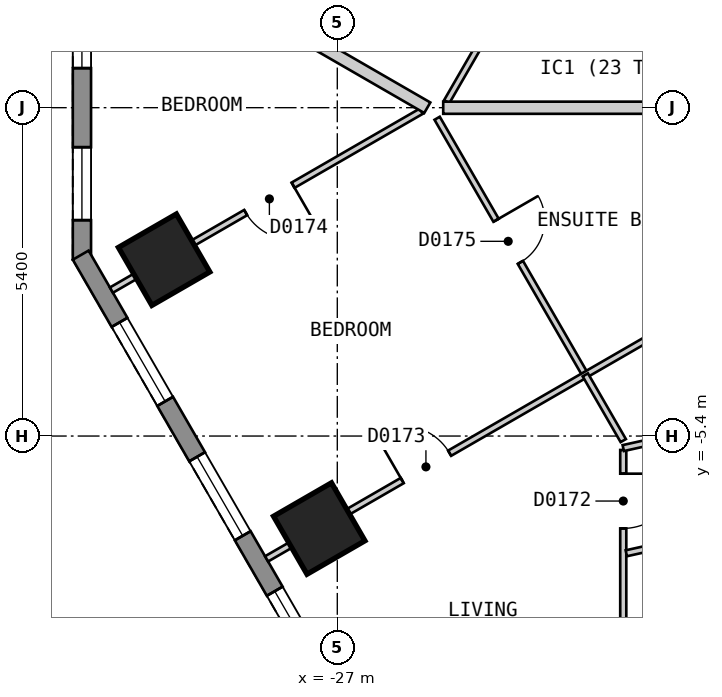
"""IFC4 building model, lengths in metres.
Left out: names, types, materials, properties, quantities, classifications, styles, units other than length and angle.
Written with IfcOpenShell. Run it as: python <this file> out.ifc"""

import sys

from ifc_helpers import new_model, si_unit, direction, frame, frame_2d, origin, origin_2d, place, context, subcontext, project, spatial, polyline, rectangle, outline, extrude, element, fill, save


model = new_model("IFC4")
c1 = context("Model", 3, precision=1e-05, world=origin(), true_north=direction((0.0, 1.0)))
c2 = subcontext(c1, "Body", "Model", "MODEL_VIEW")
j1 = project(units=[si_unit("LENGTHUNIT", "METRE"), si_unit("PLANEANGLEUNIT", "RADIAN")], contexts=[c1])
p1 = place(None, origin())
s1 = spatial("IfcSite", under=j1, at=p1, CompositionType="ELEMENT")
p2 = place(p1, origin())
s2 = spatial("IfcBuilding", under=s1, at=p2, CompositionType="ELEMENT")
p3 = place(p2, frame((0.0, 0.0, 29.4)))
s3 = spatial("IfcBuildingStorey", under=s2, at=p3, CompositionType="ELEMENT", Elevation=29.4)
for number, where, z_axis, x_axis in (
    (1, (-29.848, -2.5, 0.0), (0.0, 0.0, 1.0), (0.5, -0.866, 0.0)),
    (2, (-27.297, -6.921, 0.0), (0.0, 0.0, 1.0), (0.5, -0.866, 0.0)),
):
    element("IfcColumn", number, at=place(p3, frame(where, z_axis=z_axis, x_axis=x_axis)), inside=s3, PredefinedType="COLUMN", context=c2, shape_type="SweptSolid", body=[
        extrude(rectangle(XDim=1.1, YDim=1.1, at=origin_2d()), origin(), (0.0, 0.0, 1.0), 3.0),
    ])
p4 = place(p3, frame((-31.2, 2.5, 0.0), z_axis=(0.0, 0.0, 1.0), x_axis=(0.0, -1.0, 0.0)))
e3 = element("IfcWall", 3, at=p4, inside=s3, PredefinedType="SOLIDWALL", context=c2, shape_type="SweptSolid", body=[
    extrude(outline(polyline([(0.0, -0.15), (5.0, -0.15), (4.92, 0.15), (0.08, 0.15), (0.0, -0.15)])), origin(), (0.0, 0.0, 1.0), 2.7),
])
p5 = place(p4, frame((0.65, 0.0, 0.15)))
e4 = element("IfcOpeningElement", 4, at=p5, cuts=e3, PredefinedType="OPENING", context=c2, shape_type="SweptSolid", body=[
    extrude(rectangle(XDim=1.2, YDim=2.1, at=frame_2d((0.6, 1.05))), frame((0.0, 0.16, 0.0), z_axis=(0.0, -1.0, 0.0), x_axis=(1.0, 0.0, 0.0)), (0.0, 0.0, 1.0), 0.32),
])
p6 = place(p4, frame((3.15, 0.0, 0.15)))
e5 = element("IfcOpeningElement", 5, at=p6, cuts=e3, PredefinedType="OPENING", context=c2, shape_type="SweptSolid", body=[
    extrude(rectangle(XDim=1.2, YDim=2.1, at=frame_2d((0.6, 1.05))), frame((0.0, 0.16, 0.0), z_axis=(0.0, -1.0, 0.0), x_axis=(1.0, 0.0, 0.0)), (0.0, 0.0, 1.0), 0.32),
])
p7 = place(p3, frame((-31.22, -2.425, 0.0), z_axis=(0.0, 0.0, 1.0), x_axis=(0.500001938803, -0.866024284413, 0.0)))
e6 = element("IfcWall", 6, at=p7, inside=s3, PredefinedType="SOLIDWALL", context=c2, shape_type="SweptSolid", body=[
    extrude(outline(polyline([(0.0, -0.15), (27.02, -0.15), (26.94, 0.15), (0.08, 0.15), (0.0, -0.15)])), origin(), (0.0, 0.0, 1.0), 2.7),
])
p8 = place(p7, frame((1.277, 0.0, 0.15)))
e7 = element("IfcOpeningElement", 7, at=p8, cuts=e6, PredefinedType="OPENING", context=c2, shape_type="SweptSolid", body=[
    extrude(rectangle(XDim=1.5, YDim=2.1, at=frame_2d((0.75, 1.05))), frame((0.0, 0.16, 0.0), z_axis=(0.0, -1.0, 0.0), x_axis=(1.0, 0.0, 0.0)), (0.0, 0.0, 1.0), 0.32),
])
p9 = place(p7, frame((3.829, 0.0, 0.15)))
e8 = element("IfcOpeningElement", 8, at=p9, cuts=e6, PredefinedType="OPENING", context=c2, shape_type="SweptSolid", body=[
    extrude(rectangle(XDim=1.5, YDim=2.1, at=frame_2d((0.75, 1.05))), frame((0.0, 0.16, 0.0), z_axis=(0.0, -1.0, 0.0), x_axis=(1.0, 0.0, 0.0)), (0.0, 0.0, 1.0), 0.32),
])
p10 = place(p7, frame((6.382, 0.0, 0.15)))
e9 = element("IfcOpeningElement", 9, at=p10, cuts=e6, PredefinedType="OPENING", context=c2, shape_type="SweptSolid", body=[
    extrude(rectangle(XDim=1.5, YDim=2.1, at=frame_2d((0.75, 1.05))), frame((0.0, 0.16, 0.0), z_axis=(0.0, -1.0, 0.0), x_axis=(1.0, 0.0, 0.0)), (0.0, 0.0, 1.0), 0.32),
])
p11 = place(p7, frame((8.933, 0.0, 0.15)))
e10 = element("IfcOpeningElement", 10, at=p11, cuts=e6, PredefinedType="OPENING", context=c2, shape_type="SweptSolid", body=[
    extrude(rectangle(XDim=1.5, YDim=2.1, at=frame_2d((0.75, 1.05))), frame((0.0, 0.16, 0.0), z_axis=(0.0, -1.0, 0.0), x_axis=(1.0, 0.0, 0.0)), (0.0, 0.0, 1.0), 0.32),
])
p12 = place(p7, frame((11.485, 0.0, 0.15)))
e11 = element("IfcOpeningElement", 11, at=p12, cuts=e6, PredefinedType="OPENING", context=c2, shape_type="SweptSolid", body=[
    extrude(rectangle(XDim=1.5, YDim=2.1, at=frame_2d((0.75, 1.05))), frame((0.0, 0.16, 0.0), z_axis=(0.0, -1.0, 0.0), x_axis=(1.0, 0.0, 0.0)), (0.0, 0.0, 1.0), 0.32),
])
p13 = place(p7, frame((14.037, 0.0, 0.15)))
e12 = element("IfcOpeningElement", 12, at=p13, cuts=e6, PredefinedType="OPENING", context=c2, shape_type="SweptSolid", body=[
    extrude(rectangle(XDim=1.5, YDim=2.1, at=frame_2d((0.75, 1.05))), frame((0.0, 0.16, 0.0), z_axis=(0.0, -1.0, 0.0), x_axis=(1.0, 0.0, 0.0)), (0.0, 0.0, 1.0), 0.32),
])
p14 = place(p7, frame((16.589, 0.0, 0.15)))
e13 = element("IfcOpeningElement", 13, at=p14, cuts=e6, PredefinedType="OPENING", context=c2, shape_type="SweptSolid", body=[
    extrude(rectangle(XDim=1.5, YDim=2.1, at=frame_2d((0.75, 1.05))), frame((0.0, 0.16, 0.0), z_axis=(0.0, -1.0, 0.0), x_axis=(1.0, 0.0, 0.0)), (0.0, 0.0, 1.0), 0.32),
])
p15 = place(p7, frame((19.141, 0.0, 0.15)))
e14 = element("IfcOpeningElement", 14, at=p15, cuts=e6, PredefinedType="OPENING", context=c2, shape_type="SweptSolid", body=[
    extrude(rectangle(XDim=1.5, YDim=2.1, at=frame_2d((0.75, 1.05))), frame((0.0, 0.16, 0.0), z_axis=(0.0, -1.0, 0.0), x_axis=(1.0, 0.0, 0.0)), (0.0, 0.0, 1.0), 0.32),
])
p16 = place(p7, frame((21.693, 0.0, 0.15)))
e15 = element("IfcOpeningElement", 15, at=p16, cuts=e6, PredefinedType="OPENING", context=c2, shape_type="SweptSolid", body=[
    extrude(rectangle(XDim=1.5, YDim=2.1, at=frame_2d((0.75, 1.05))), frame((0.0, 0.16, 0.0), z_axis=(0.0, -1.0, 0.0), x_axis=(1.0, 0.0, 0.0)), (0.0, 0.0, 1.0), 0.32),
])
p17 = place(p7, frame((24.244, 0.0, 0.15)))
e16 = element("IfcOpeningElement", 16, at=p17, cuts=e6, PredefinedType="OPENING", context=c2, shape_type="SweptSolid", body=[
    extrude(rectangle(XDim=1.5, YDim=2.1, at=frame_2d((0.75, 1.05))), frame((0.0, 0.16, 0.0), z_axis=(0.0, -1.0, 0.0), x_axis=(1.0, 0.0, 0.0)), (0.0, 0.0, 1.0), 0.32),
])
p18 = place(p3, frame((-25.358, -0.174, 0.0), z_axis=(0.0, 0.0, 1.0), x_axis=(0.500093956194, -0.865971151354, 0.0)))
e17 = element("IfcWall", 17, at=p18, inside=s3, PredefinedType="PARTITIONING", context=c2, shape_type="SweptSolid", body=[
    extrude(rectangle(XDim=4.873, YDim=0.1, at=frame_2d((2.437, 0.0))), origin(), (0.0, 0.0, 1.0), 2.7),
])
p19 = place(p18, frame((1.937, 0.0, 0.0)))
e18 = element("IfcOpeningElement", 18, at=p19, cuts=e17, PredefinedType="OPENING", context=c2, shape_type="SweptSolid", body=[
    extrude(rectangle(XDim=0.8, YDim=2.1, at=frame_2d((0.4, 1.05))), frame((0.0, 0.06, 0.0), z_axis=(0.0, -1.0, 0.0), x_axis=(1.0, 0.0, 0.0)), (0.0, 0.0, 1.0), 0.12),
])
p20 = place(p3, frame((-25.2, 0.099, 0.0), z_axis=(0.0, 0.0, 1.0), x_axis=(0.49997477318, 0.866039968006, 0.0)))
e19 = element("IfcWall", 19, at=p20, inside=s3, PredefinedType="PARTITIONING", context=c2, shape_type="SweptSolid", body=[
    extrude(rectangle(XDim=14.965, YDim=0.1, at=frame_2d((7.482, 0.0))), origin(), (0.0, 0.0, 1.0), 2.7),
])
p21 = place(p20, frame((6.96, 0.0, 0.0)))
e20 = element("IfcOpeningElement", 20, at=p21, cuts=e19, PredefinedType="OPENING", context=c2, shape_type="SweptSolid", body=[
    extrude(rectangle(XDim=0.9, YDim=2.1, at=frame_2d((0.45, 1.05))), frame((0.0, 0.06, 0.0), z_axis=(0.0, -1.0, 0.0), x_axis=(1.0, 0.0, 0.0)), (0.0, 0.0, 1.0), 0.12),
])
p22 = place(p3, frame((-22.297, -9.813, 0.0), z_axis=(0.0, 0.0, 1.0), x_axis=(0.0, 1.0, 0.0)))
e21 = element("IfcWall", 21, at=p22, inside=s3, PredefinedType="PARTITIONING", context=c2, shape_type="SweptSolid", body=[
    extrude(rectangle(XDim=4.184, YDim=0.1, at=frame_2d((2.092, 0.0))), origin(), (0.0, 0.0, 1.0), 2.7),
])
p23 = place(p22, frame((2.894, 0.0, 0.0)))
e22 = element("IfcOpeningElement", 22, at=p23, cuts=e21, PredefinedType="OPENING", context=c2, shape_type="SweptSolid", body=[
    extrude(rectangle(XDim=0.9, YDim=2.1, at=frame_2d((0.45, 1.05))), frame((0.0, 0.06, 0.0), z_axis=(0.0, -1.0, 0.0), x_axis=(1.0, 0.0, 0.0)), (0.0, 0.0, 1.0), 0.12),
])
p24 = place(p3, frame((-22.297, -5.598, 0.0), z_axis=(0.0, 0.0, 1.0), x_axis=(0.976341239907, 0.216235481033, 0.0)))
e23 = element("IfcWall", 23, at=p24, inside=s3, PredefinedType="PARTITIONING", context=c2, shape_type="SweptSolid", body=[
    extrude(rectangle(XDim=4.203, YDim=0.1, at=frame_2d((2.102, 0.0))), origin(), (0.0, 0.0, 1.0), 2.7),
])
p25 = place(p24, frame((1.754, 0.0, 0.0)))
e24 = element("IfcOpeningElement", 24, at=p25, cuts=e23, PredefinedType="OPENING", context=c2, shape_type="SweptSolid", body=[
    extrude(rectangle(XDim=0.8, YDim=2.1, at=frame_2d((0.4, 1.05))), frame((0.0, 0.06, 0.0), z_axis=(0.0, -1.0, 0.0), x_axis=(1.0, 0.0, 0.0)), (0.0, 0.0, 1.0), 0.12),
])
p26 = place(p3, frame((-22.247, -7.328, 0.0), z_axis=(0.0, 0.0, 1.0), x_axis=(0.976310522972, 0.216374126765, 0.0)))
e25 = element("IfcWall", 25, at=p26, inside=s3, PredefinedType="PARTITIONING", context=c2, shape_type="SweptSolid", body=[
    extrude(rectangle(XDim=5.065, YDim=0.1, at=frame_2d((2.532, 0.0))), origin(), (0.0, 0.0, 1.0), 2.7),
])
p27 = place(p26, frame((2.109, 0.0, 0.0)))
e26 = element("IfcOpeningElement", 26, at=p27, cuts=e25, PredefinedType="OPENING", context=c2, shape_type="SweptSolid", body=[
    extrude(rectangle(XDim=0.9, YDim=2.1, at=frame_2d((0.45, 1.05))), frame((0.0, 0.06, 0.0), z_axis=(0.0, -1.0, 0.0), x_axis=(1.0, 0.0, 0.0)), (0.0, 0.0, 1.0), 0.12),
])
p28 = place(p3, frame((-28.163, -7.42, 0.0), z_axis=(0.0, 0.0, 1.0), x_axis=(0.866065245018, 0.499930986609, 0.0)))
e27 = element("IfcWall", 27, at=p28, inside=s3, PredefinedType="PARTITIONING", context=c2, shape_type="SweptSolid", body=[
    extrude(rectangle(XDim=10.0, YDim=0.1, at=frame_2d((5.0, 0.0))), origin(), (0.0, 0.0, 1.0), 2.7),
])
p29 = place(p28, frame((2.576, 0.0, 0.0)))
e28 = element("IfcOpeningElement", 28, at=p29, cuts=e27, PredefinedType="OPENING", context=c2, shape_type="SweptSolid", body=[
    extrude(rectangle(XDim=0.9, YDim=2.1, at=frame_2d((0.45, 1.05))), frame((0.0, 0.06, 0.0), z_axis=(0.0, -1.0, 0.0), x_axis=(1.0, 0.0, 0.0)), (0.0, 0.0, 1.0), 0.12),
])
p30 = place(p3, frame((-30.715, -3.0, 0.0), z_axis=(0.0, 0.0, 1.0), x_axis=(0.866054318203, 0.499949915414, 0.0)))
e29 = element("IfcWall", 29, at=p30, inside=s3, PredefinedType="PARTITIONING", context=c2, shape_type="SweptSolid", body=[
    extrude(rectangle(XDim=5.884, YDim=0.1, at=frame_2d((2.942, 0.0))), origin(), (0.0, 0.0, 1.0), 2.7),
])
p31 = place(p30, frame((2.55, 0.0, 0.0)))
e30 = element("IfcOpeningElement", 30, at=p31, cuts=e29, PredefinedType="OPENING", context=c2, shape_type="SweptSolid", body=[
    extrude(rectangle(XDim=0.9, YDim=2.1, at=frame_2d((0.45, 1.05))), frame((0.0, 0.06, 0.0), z_axis=(0.0, -1.0, 0.0), x_axis=(1.0, 0.0, 0.0)), (0.0, 0.0, 1.0), 0.12),
])
p32 = place(p3, frame((-30.716, 2.999, 0.0), z_axis=(0.0, 0.0, 1.0), x_axis=(0.866020924479, -0.500007758305, 0.0)))
e31 = element("IfcWall", 31, at=p32, inside=s3, PredefinedType="PARTITIONING", context=c2, shape_type="SweptSolid", body=[
    extrude(rectangle(XDim=6.0, YDim=0.2, at=frame_2d((3.0, 0.0))), origin(), (0.0, 0.0, 1.0), 2.7),
])
p33 = place(p3, frame((-25.258, -0.001, 0.0), z_axis=(0.0, 0.0, 1.0), x_axis=(1.0, 0.0, 0.0)))
e32 = element("IfcWall", 32, at=p33, inside=s3, PredefinedType="PARTITIONING", context=c2, shape_type="SweptSolid", body=[
    extrude(rectangle(XDim=4.474, YDim=0.2, at=frame_2d((2.237, 0.0))), origin(), (0.0, 0.0, 1.0), 2.7),
])
p34 = place(p3, frame((-25.61, -11.841, 0.0), z_axis=(0.0, 0.0, 1.0), x_axis=(0.866019023803, 0.500011050288, 0.0)))
e33 = element("IfcWall", 33, at=p34, inside=s3, PredefinedType="PARTITIONING", context=c2, shape_type="SweptSolid", body=[
    extrude(rectangle(XDim=8.47, YDim=0.2, at=frame_2d((4.235, 0.0))), origin(), (0.0, 0.0, 1.0), 2.7),
])
p35 = place(p3, frame((-22.921, -4.394, 0.0), z_axis=(0.0, 0.0, 1.0), x_axis=(0.49977889874, -0.86615301903, 0.0)))
e34 = element("IfcWall", 34, at=p35, inside=s3, PredefinedType="PARTITIONING", context=c2, shape_type="SweptSolid", body=[
    extrude(rectangle(XDim=1.248, YDim=0.1, at=frame_2d((0.624, 0.0))), origin(), (0.0, 0.0, 1.0), 2.7),
])
p36 = place(p5, origin())
e35 = element("IfcWindow", 35, at=p36, inside=s3, PartitioningType="SINGLE_PANEL", PredefinedType="WINDOW", context=c2, shape_type="SweptSolid", body=[
    extrude(rectangle(XDim=1.2, YDim=2.1, at=frame_2d((0.6, 1.05))), frame((0.0, 0.03, 0.0), z_axis=(0.0, -1.0, 0.0), x_axis=(1.0, 0.0, 0.0)), (0.0, 0.0, 1.0), 0.06),
])
fill(e4, e35)
p37 = place(p6, origin())
e36 = element("IfcWindow", 36, at=p37, inside=s3, PartitioningType="SINGLE_PANEL", PredefinedType="WINDOW", context=c2, shape_type="SweptSolid", body=[
    extrude(rectangle(XDim=1.2, YDim=2.1, at=frame_2d((0.6, 1.05))), frame((0.0, 0.03, 0.0), z_axis=(0.0, -1.0, 0.0), x_axis=(1.0, 0.0, 0.0)), (0.0, 0.0, 1.0), 0.06),
])
fill(e5, e36)
p38 = place(p8, origin())
e37 = element("IfcWindow", 37, at=p38, inside=s3, PartitioningType="SINGLE_PANEL", PredefinedType="WINDOW", context=c2, shape_type="SweptSolid", body=[
    extrude(rectangle(XDim=1.5, YDim=2.1, at=frame_2d((0.75, 1.05))), frame((0.0, 0.03, 0.0), z_axis=(0.0, -1.0, 0.0), x_axis=(1.0, 0.0, 0.0)), (0.0, 0.0, 1.0), 0.06),
])
fill(e7, e37)
p39 = place(p9, origin())
e38 = element("IfcWindow", 38, at=p39, inside=s3, PartitioningType="SINGLE_PANEL", PredefinedType="WINDOW", context=c2, shape_type="SweptSolid", body=[
    extrude(rectangle(XDim=1.5, YDim=2.1, at=frame_2d((0.75, 1.05))), frame((0.0, 0.03, 0.0), z_axis=(0.0, -1.0, 0.0), x_axis=(1.0, 0.0, 0.0)), (0.0, 0.0, 1.0), 0.06),
])
fill(e8, e38)
p40 = place(p10, origin())
e39 = element("IfcWindow", 39, at=p40, inside=s3, PartitioningType="SINGLE_PANEL", PredefinedType="WINDOW", context=c2, shape_type="SweptSolid", body=[
    extrude(rectangle(XDim=1.5, YDim=2.1, at=frame_2d((0.75, 1.05))), frame((0.0, 0.03, 0.0), z_axis=(0.0, -1.0, 0.0), x_axis=(1.0, 0.0, 0.0)), (0.0, 0.0, 1.0), 0.06),
])
fill(e9, e39)
p41 = place(p23, origin())
e40 = element("IfcDoor", 40, at=p41, inside=s3, OperationType="SINGLE_SWING_RIGHT", PredefinedType="DOOR", context=c2, shape_type="SweptSolid", body=[
    extrude(rectangle(XDim=0.9, YDim=2.1, at=frame_2d((0.45, 1.05))), frame((0.0, 0.025, 0.0), z_axis=(0.0, -1.0, 0.0), x_axis=(1.0, 0.0, 0.0)), (0.0, 0.0, 1.0), 0.05),
])
fill(e22, e40)
p42 = place(p29, origin())
e41 = element("IfcDoor", 41, at=p42, inside=s3, OperationType="SINGLE_SWING_LEFT", PredefinedType="DOOR", context=c2, shape_type="SweptSolid", body=[
    extrude(rectangle(XDim=0.9, YDim=2.1, at=frame_2d((0.45, 1.05))), frame((0.0, 0.025, 0.0), z_axis=(0.0, -1.0, 0.0), x_axis=(1.0, 0.0, 0.0)), (0.0, 0.0, 1.0), 0.05),
])
fill(e28, e41)
p43 = place(p31, origin())
e42 = element("IfcDoor", 42, at=p43, inside=s3, OperationType="SINGLE_SWING_RIGHT", PredefinedType="DOOR", context=c2, shape_type="SweptSolid", body=[
    extrude(rectangle(XDim=0.9, YDim=2.1, at=frame_2d((0.45, 1.05))), frame((0.0, 0.025, 0.0), z_axis=(0.0, -1.0, 0.0), x_axis=(1.0, 0.0, 0.0)), (0.0, 0.0, 1.0), 0.05),
])
fill(e30, e42)
p44 = place(p19, origin())
e43 = element("IfcDoor", 43, at=p44, inside=s3, OperationType="SINGLE_SWING_LEFT", PredefinedType="DOOR", context=c2, shape_type="SweptSolid", body=[
    extrude(rectangle(XDim=0.8, YDim=2.1, at=frame_2d((0.4, 1.05))), frame((0.0, 0.025, 0.0), z_axis=(0.0, -1.0, 0.0), x_axis=(1.0, 0.0, 0.0)), (0.0, 0.0, 1.0), 0.05),
])
fill(e18, e43)
save(model, sys.argv[1])
